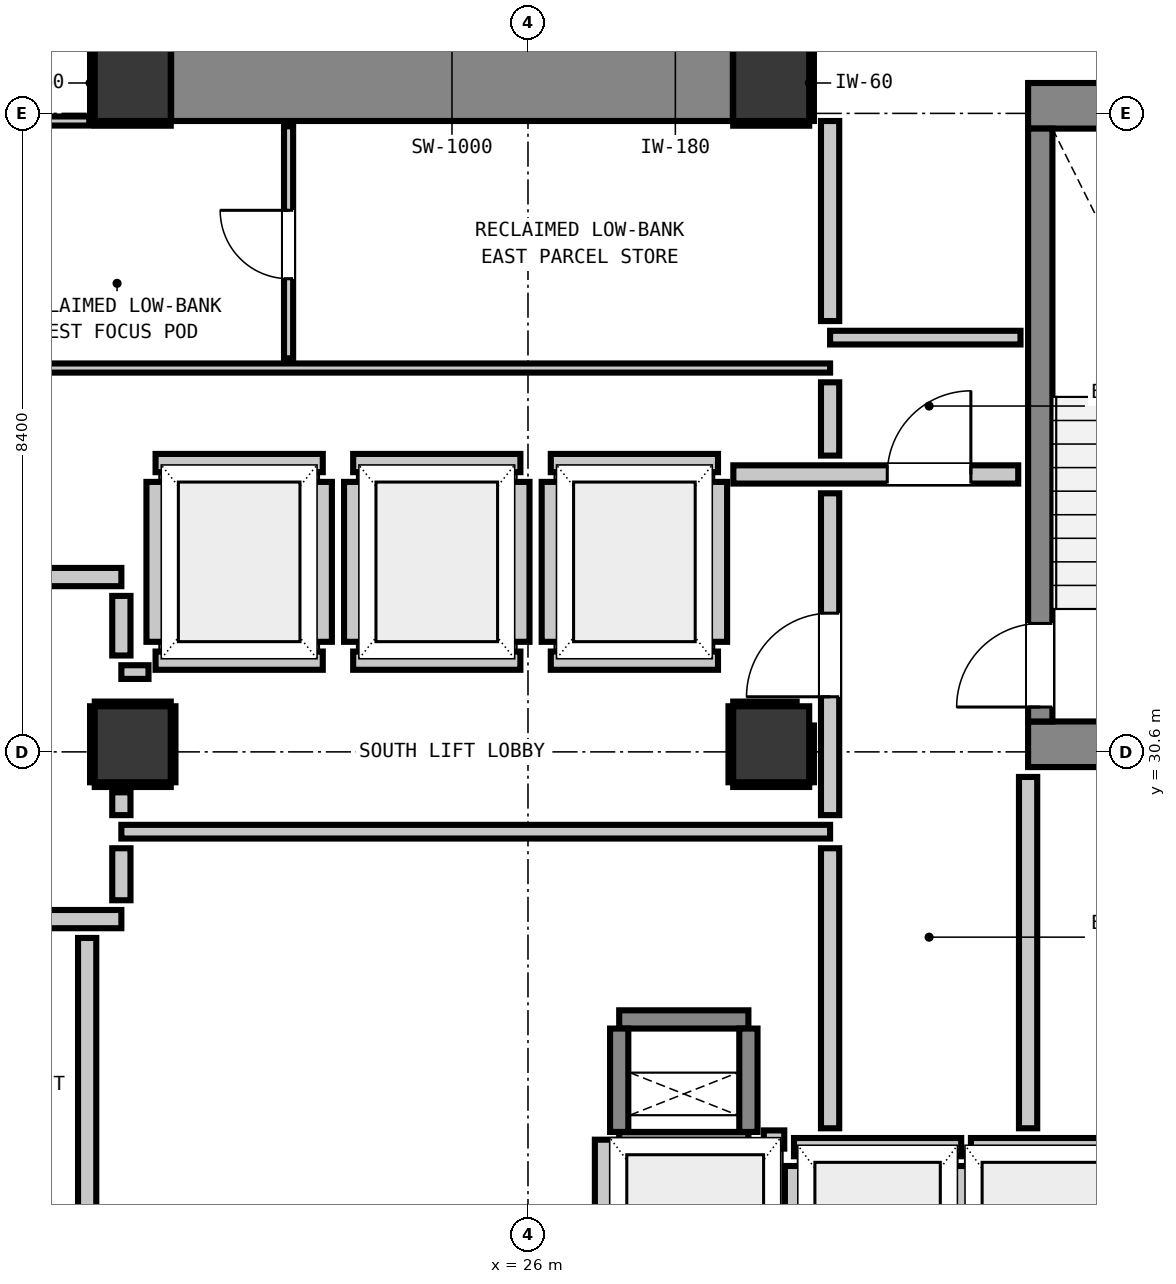
"""IFC4 building model, lengths in metres.
Left out: names, types, materials, properties, quantities, classifications, styles, units other than length and angle.
Written with IfcOpenShell. Run it as: python <this file> out.ifc"""

import sys

from ifc_helpers import new_model, si_unit, direction, frame, frame_2d, origin, origin_2d, place, context, subcontext, project, spatial, rectangle, extrude, element, fill, save


model = new_model("IFC4")
c1 = context("Model", 3, precision=1e-05, world=origin(), true_north=direction((0.0, 1.0)))
c2 = subcontext(c1, "Body", "Model", "MODEL_VIEW")
j1 = project(units=[si_unit("LENGTHUNIT", "METRE"), si_unit("PLANEANGLEUNIT", "RADIAN")], contexts=[c1])
p1 = place(None, origin())
s1 = spatial("IfcSite", under=j1, at=p1, CompositionType="ELEMENT")
p2 = place(p1, origin())
s2 = spatial("IfcBuilding", under=s1, at=p2, CompositionType="ELEMENT")
p3 = place(p2, frame((0.0, 0.0, 139.28)))
s3 = spatial("IfcBuildingStorey", under=s2, at=p3, CompositionType="ELEMENT", Elevation=139.28)
for number, where, z_axis, x_axis in (
    (1, (20.8, 39.4, 0.0), (0.0, 0.0, 1.0), (1.0, 0.0, 0.0)),
    (2, (29.2, 39.4, 0.0), (0.0, 0.0, 1.0), (1.0, 0.0, 0.0)),
):
    element("IfcColumn", number, at=place(p3, frame(where, z_axis=z_axis, x_axis=x_axis)), inside=s3, PredefinedType="COLUMN", context=c2, shape_type="SweptSolid", body=[
        extrude(rectangle(XDim=1.0, YDim=1.0, at=origin_2d()), origin(), (0.0, 0.0, 1.0), 3.32),
    ])
p4 = place(p3, frame((32.58, 39.1, 0.0), z_axis=(0.0, 0.0, 1.0), x_axis=(1.0, 0.0, 0.0)))
e3 = element("IfcWall", 3, at=p4, inside=s3, PredefinedType="SHEAR", context=c2, shape_type="SweptSolid", body=[
    extrude(rectangle(XDim=4.08, YDim=0.6, at=frame_2d((2.04, 0.0))), origin(), (0.0, 0.0, 1.0), 3.32),
])
p5 = place(p3, frame((32.58, 30.7, 0.0), z_axis=(0.0, 0.0, 1.0), x_axis=(1.0, 0.0, 0.0)))
e4 = element("IfcWall", 4, at=p5, inside=s3, PredefinedType="SHEAR", context=c2, shape_type="SweptSolid", body=[
    extrude(rectangle(XDim=3.415, YDim=0.6, at=frame_2d((1.708, 0.0))), origin(), (0.0, 0.0, 1.0), 3.32),
])
p6 = place(p3, frame((21.305, 39.4, 0.0), z_axis=(0.0, 0.0, 1.0), x_axis=(1.0, 0.0, 0.0)))
e5 = element("IfcWall", 5, at=p6, inside=s3, PredefinedType="SHEAR", context=c2, shape_type="SweptSolid", body=[
    extrude(rectangle(XDim=7.39, YDim=1.0, at=frame_2d((3.695, 0.0))), origin(), (0.0, 0.0, 1.0), 3.32),
])
p7 = place(p3, frame((32.74, 31.0, 0.0), z_axis=(0.0, 0.0, 1.0), x_axis=(0.0, 1.0, 0.0)))
e6 = element("IfcWall", 6, at=p7, inside=s3, PredefinedType="SHEAR", context=c2, shape_type="SweptSolid", body=[
    extrude(rectangle(XDim=7.8, YDim=0.32, at=frame_2d((3.9, 0.0))), origin(), (0.0, 0.0, 1.0), 3.32),
])
p8 = place(p7, frame((0.19, 0.0, 0.0)))
e7 = element("IfcOpeningElement", 7, at=p8, cuts=e6, PredefinedType="OPENING", context=c2, shape_type="SweptSolid", body=[
    extrude(rectangle(XDim=1.1, YDim=2.15, at=frame_2d((0.55, 1.075))), frame((0.0, 0.17, 0.0), z_axis=(0.0, -1.0, 0.0), x_axis=(1.0, 0.0, 0.0)), (0.0, 0.0, 1.0), 0.34),
])
for number, where, z_axis, x_axis in (
    (8, (27.2, 25.48, 0.0), (0.0, 0.0, 1.0), (1.0, 0.0, 0.0)),
    (9, (27.2, 27.08, 0.0), (0.0, 0.0, 1.0), (1.0, 0.0, 0.0)),
):
    element("IfcWall", number, at=place(p3, frame(where, z_axis=z_axis, x_axis=x_axis)), inside=s3, PredefinedType="SHEAR", context=c2, shape_type="SweptSolid", body=[
        extrude(rectangle(XDim=1.7, YDim=0.24, at=frame_2d((0.85, 0.0))), origin(), (0.0, 0.0, 1.0), 3.32),
    ])
for number, where, z_axis, x_axis in (
    (10, (27.2, 25.6, 0.0), (0.0, 0.0, 1.0), (0.0, 1.0, 0.0)),
    (11, (28.9, 25.6, 0.0), (0.0, 0.0, 1.0), (0.0, 1.0, 0.0)),
):
    element("IfcWall", number, at=place(p3, frame(where, z_axis=z_axis, x_axis=x_axis)), inside=s3, PredefinedType="SHEAR", context=c2, shape_type="SweptSolid", body=[
        extrude(rectangle(XDim=1.36, YDim=0.24, at=frame_2d((0.68, 0.0))), origin(), (0.0, 0.0, 1.0), 3.32),
    ])
for number, where, z_axis, x_axis in (
    (12, (20.8, 30.7, 0.0), (0.0, 0.0, 1.0), (1.0, 0.0, 0.0)),
    (13, (29.2, 30.7, 0.0), (0.0, 0.0, 1.0), (1.0, 0.0, 0.0)),
):
    element("IfcColumn", number, at=place(p3, frame(where, z_axis=z_axis, x_axis=x_axis)), inside=s3, PredefinedType="COLUMN", context=c2, shape_type="SweptSolid", body=[
        extrude(rectangle(XDim=1.0, YDim=1.0, at=origin_2d()), origin(), (0.0, 0.0, 1.0), 3.32),
    ])
for number, where, z_axis, x_axis in (
    (14, (21.1, 31.8, 0.0), (0.0, 0.0, 1.0), (1.0, 0.0, 0.0)),
    (15, (21.1, 34.4, 0.0), (0.0, 0.0, 1.0), (1.0, 0.0, 0.0)),
):
    element("IfcWall", number, at=place(p3, frame(where, z_axis=z_axis, x_axis=x_axis)), inside=s3, PredefinedType="PARTITIONING", context=c2, shape_type="SweptSolid", body=[
        extrude(rectangle(XDim=2.2, YDim=0.24, at=frame_2d((1.1, 0.0))), origin(), (0.0, 0.0, 1.0), 3.08),
    ])
p9 = place(p3, frame((21.1, 32.048, 0.0), z_axis=(0.0, 0.0, 1.0), x_axis=(0.0, 1.0, 0.0)))
e16 = element("IfcWall", 16, at=p9, inside=s3, PredefinedType="PARTITIONING", context=c2, shape_type="SweptSolid", body=[
    extrude(rectangle(XDim=2.104, YDim=0.24, at=frame_2d((1.052, 0.0))), origin(), (0.0, 0.0, 1.0), 2.315),
])
p10 = place(p3, frame((23.3, 32.048, 0.0), z_axis=(0.0, 0.0, 1.0), x_axis=(0.0, 1.0, 0.0)))
e17 = element("IfcWall", 17, at=p10, inside=s3, PredefinedType="PARTITIONING", context=c2, shape_type="SweptSolid", body=[
    extrude(rectangle(XDim=2.104, YDim=0.24, at=frame_2d((1.052, 0.0))), origin(), (0.0, 0.0, 1.0), 3.08),
])
for number, where, z_axis, x_axis in (
    (18, (23.7, 31.8, 0.0), (0.0, 0.0, 1.0), (1.0, 0.0, 0.0)),
    (19, (23.7, 34.4, 0.0), (0.0, 0.0, 1.0), (1.0, 0.0, 0.0)),
):
    element("IfcWall", number, at=place(p3, frame(where, z_axis=z_axis, x_axis=x_axis)), inside=s3, PredefinedType="PARTITIONING", context=c2, shape_type="SweptSolid", body=[
        extrude(rectangle(XDim=2.2, YDim=0.24, at=frame_2d((1.1, 0.0))), origin(), (0.0, 0.0, 1.0), 3.08),
    ])
for number, where, z_axis, x_axis in (
    (20, (23.7, 32.048, 0.0), (0.0, 0.0, 1.0), (0.0, 1.0, 0.0)),
    (21, (25.9, 32.048, 0.0), (0.0, 0.0, 1.0), (0.0, 1.0, 0.0)),
):
    element("IfcWall", number, at=place(p3, frame(where, z_axis=z_axis, x_axis=x_axis)), inside=s3, PredefinedType="PARTITIONING", context=c2, shape_type="SweptSolid", body=[
        extrude(rectangle(XDim=2.104, YDim=0.24, at=frame_2d((1.052, 0.0))), origin(), (0.0, 0.0, 1.0), 3.08),
    ])
for number, where, z_axis, x_axis in (
    (22, (26.3, 31.8, 0.0), (0.0, 0.0, 1.0), (1.0, 0.0, 0.0)),
    (23, (26.3, 34.4, 0.0), (0.0, 0.0, 1.0), (1.0, 0.0, 0.0)),
):
    element("IfcWall", number, at=place(p3, frame(where, z_axis=z_axis, x_axis=x_axis)), inside=s3, PredefinedType="PARTITIONING", context=c2, shape_type="SweptSolid", body=[
        extrude(rectangle(XDim=2.2, YDim=0.24, at=frame_2d((1.1, 0.0))), origin(), (0.0, 0.0, 1.0), 3.08),
    ])
for number, where, z_axis, x_axis in (
    (24, (26.3, 32.048, 0.0), (0.0, 0.0, 1.0), (0.0, 1.0, 0.0)),
    (25, (28.5, 32.048, 0.0), (0.0, 0.0, 1.0), (0.0, 1.0, 0.0)),
):
    element("IfcWall", number, at=place(p3, frame(where, z_axis=z_axis, x_axis=x_axis)), inside=s3, PredefinedType="PARTITIONING", context=c2, shape_type="SweptSolid", body=[
        extrude(rectangle(XDim=2.104, YDim=0.24, at=frame_2d((1.052, 0.0))), origin(), (0.0, 0.0, 1.0), 3.08),
    ])
p11 = place(p3, frame((29.5, 25.4, 0.0), z_axis=(0.0, 0.0, 1.0), x_axis=(1.0, 0.0, 0.0)))
e26 = element("IfcWall", 26, at=p11, inside=s3, PredefinedType="PARTITIONING", context=c2, shape_type="SweptSolid", body=[
    extrude(rectangle(XDim=2.2, YDim=0.24, at=frame_2d((1.1, 0.0))), origin(), (0.0, 0.0, 1.0), 3.08),
])
p12 = place(p3, frame((29.5, 22.632, 0.0), z_axis=(0.0, 0.0, 1.0), x_axis=(0.0, 1.0, 0.0)))
e27 = element("IfcWall", 27, at=p12, inside=s3, PredefinedType="PARTITIONING", context=c2, shape_type="SweptSolid", body=[
    extrude(rectangle(XDim=2.52, YDim=0.24, at=frame_2d((1.26, 0.0))), origin(), (0.0, 0.0, 1.0), 2.315),
])
p13 = place(p3, frame((31.7, 22.63, 0.0), z_axis=(0.0, 0.0, 1.0), x_axis=(0.0, 1.0, 0.0)))
e28 = element("IfcWall", 28, at=p13, inside=s3, PredefinedType="PARTITIONING", context=c2, shape_type="SweptSolid", body=[
    extrude(rectangle(XDim=2.522, YDim=0.24, at=frame_2d((1.261, 0.0))), origin(), (0.0, 0.0, 1.0), 3.08),
])
p14 = place(p3, frame((31.828, 25.4, 0.0), z_axis=(0.0, 0.0, 1.0), x_axis=(1.0, 0.0, 0.0)))
e29 = element("IfcWall", 29, at=p14, inside=s3, PredefinedType="PARTITIONING", context=c2, shape_type="SweptSolid", body=[
    extrude(rectangle(XDim=2.072, YDim=0.24, at=frame_2d((1.036, 0.0))), origin(), (0.0, 0.0, 1.0), 3.08),
])
p15 = place(p3, frame((29.103, 25.5, 0.0), z_axis=(0.0, 0.0, 1.0), x_axis=(1.0, 0.0, 0.0)))
e30 = element("IfcWall", 30, at=p15, inside=s3, PredefinedType="PARTITIONING", context=c2, shape_type="SweptSolid", body=[
    extrude(rectangle(XDim=0.269, YDim=0.24, at=frame_2d((0.135, 0.0))), origin(), (0.0, 0.0, 1.0), 3.08),
])
p16 = place(p3, frame((27.0, 22.63, 0.0), z_axis=(0.0, 0.0, 1.0), x_axis=(0.0, 1.0, 0.0)))
e31 = element("IfcWall", 31, at=p16, inside=s3, PredefinedType="PARTITIONING", context=c2, shape_type="SweptSolid", body=[
    extrude(rectangle(XDim=2.868, YDim=0.24, at=frame_2d((1.434, 0.0))), origin(), (0.0, 0.0, 1.0), 3.08),
])
p17 = place(p3, frame((17.45, 28.4, 0.0), z_axis=(0.0, 0.0, 1.0), x_axis=(1.0, 0.0, 0.0)))
e32 = element("IfcWall", 32, at=p17, inside=s3, PredefinedType="PARTITIONING", context=c2, shape_type="SweptSolid", body=[
    extrude(rectangle(XDim=3.2, YDim=0.24, at=frame_2d((1.6, 0.0))), origin(), (0.0, 0.0, 1.0), 3.08),
])
p18 = place(p17, frame((0.784, 0.0, 0.0)))
e33 = element("IfcOpeningElement", 33, at=p18, cuts=e32, PredefinedType="OPENING", context=c2, shape_type="SweptSolid", body=[
    extrude(rectangle(XDim=1.1, YDim=2.15, at=frame_2d((0.55, 1.075))), frame((0.0, 0.13, 0.0), z_axis=(0.0, -1.0, 0.0), x_axis=(1.0, 0.0, 0.0)), (0.0, 0.0, 1.0), 0.26),
])
p19 = place(p3, frame((17.45, 32.9, 0.0), z_axis=(0.0, 0.0, 1.0), x_axis=(1.0, 0.0, 0.0)))
e34 = element("IfcWall", 34, at=p19, inside=s3, PredefinedType="PARTITIONING", context=c2, shape_type="SweptSolid", body=[
    extrude(rectangle(XDim=3.2, YDim=0.24, at=frame_2d((1.6, 0.0))), origin(), (0.0, 0.0, 1.0), 3.08),
])
p20 = place(p19, frame((0.159, 0.0, 0.0)))
e35 = element("IfcOpeningElement", 35, at=p20, cuts=e34, PredefinedType="OPENING", context=c2, shape_type="SweptSolid", body=[
    extrude(rectangle(XDim=1.1, YDim=2.15, at=frame_2d((0.55, 1.075))), frame((0.0, 0.13, 0.0), z_axis=(0.0, -1.0, 0.0), x_axis=(1.0, 0.0, 0.0)), (0.0, 0.0, 1.0), 0.26),
])
p21 = place(p3, frame((28.702, 34.25, 0.0), z_axis=(0.0, 0.0, 1.0), x_axis=(1.0, 0.0, 0.0)))
e36 = element("IfcWall", 36, at=p21, inside=s3, PredefinedType="PARTITIONING", context=c2, shape_type="SweptSolid", body=[
    extrude(rectangle(XDim=3.748, YDim=0.24, at=frame_2d((1.874, 0.0))), origin(), (0.0, 0.0, 1.0), 3.08),
])
p22 = place(p21, frame((2.025, 0.0, 0.0)))
e37 = element("IfcOpeningElement", 37, at=p22, cuts=e36, PredefinedType="OPENING", context=c2, shape_type="SweptSolid", body=[
    extrude(rectangle(XDim=1.1, YDim=2.15, at=frame_2d((0.55, 1.075))), frame((0.0, 0.13, 0.0), z_axis=(0.0, -1.0, 0.0), x_axis=(1.0, 0.0, 0.0)), (0.0, 0.0, 1.0), 0.26),
])
p23 = place(p3, frame((20.65, 29.55, 0.0), z_axis=(0.0, 0.0, 1.0), x_axis=(1.0, 0.0, 0.0)))
e38 = element("IfcWall", 38, at=p23, inside=s3, PredefinedType="PARTITIONING", context=c2, shape_type="SweptSolid", body=[
    extrude(rectangle(XDim=9.325, YDim=0.18, at=frame_2d((4.663, 0.0))), origin(), (0.0, 0.0, 1.0), 3.08),
])
p24 = place(p3, frame((20.65, 31.65, 0.0), z_axis=(0.0, 0.0, 1.0), x_axis=(1.0, 0.0, 0.0)))
e39 = element("IfcWall", 39, at=p24, inside=s3, PredefinedType="PARTITIONING", context=c2, shape_type="SweptSolid", body=[
    extrude(rectangle(XDim=0.357, YDim=0.18, at=frame_2d((0.179, 0.0))), origin(), (0.0, 0.0, 1.0), 3.08),
])
p25 = place(p3, frame((29.975, 36.05, 0.0), z_axis=(0.0, 0.0, 1.0), x_axis=(1.0, 0.0, 0.0)))
e40 = element("IfcWall", 40, at=p25, inside=s3, PredefinedType="PARTITIONING", context=c2, shape_type="SweptSolid", body=[
    extrude(rectangle(XDim=2.505, YDim=0.18, at=frame_2d((1.252, 0.0))), origin(), (0.0, 0.0, 1.0), 3.08),
])
p26 = place(p3, frame((18.95, 35.65, 0.0), z_axis=(0.0, 0.0, 1.0), x_axis=(1.0, 0.0, 0.0)))
e41 = element("IfcWall", 41, at=p26, inside=s3, PredefinedType="PARTITIONING", context=c2, shape_type="SweptSolid", body=[
    extrude(rectangle(XDim=11.025, YDim=0.12, at=frame_2d((5.513, 0.0))), origin(), (0.0, 0.0, 1.0), 3.08),
])
p27 = place(p3, frame((18.95, 38.9, 0.0), z_axis=(0.0, 0.0, 1.0), x_axis=(1.0, 0.0, 0.0)))
e42 = element("IfcWall", 42, at=p27, inside=s3, PredefinedType="PARTITIONING", context=c2, shape_type="SweptSolid", body=[
    extrude(rectangle(XDim=1.278, YDim=0.12, at=frame_2d((0.639, 0.0))), origin(), (0.0, 0.0, 1.0), 3.08),
])
p28 = place(p3, frame((20.2, 22.586, 0.0), z_axis=(0.0, 0.0, 1.0), x_axis=(0.0, 1.0, 0.0)))
e43 = element("IfcWall", 43, at=p28, inside=s3, PredefinedType="PARTITIONING", context=c2, shape_type="SweptSolid", body=[
    extrude(rectangle(XDim=5.566, YDim=0.24, at=frame_2d((2.783, 0.0))), origin(), (0.0, 0.0, 1.0), 3.08),
])
p29 = place(p3, frame((20.65, 28.648, 0.0), z_axis=(0.0, 0.0, 1.0), x_axis=(0.0, 1.0, 0.0)))
e44 = element("IfcWall", 44, at=p29, inside=s3, PredefinedType="PARTITIONING", context=c2, shape_type="SweptSolid", body=[
    extrude(rectangle(XDim=0.684, YDim=0.24, at=frame_2d((0.342, 0.0))), origin(), (0.0, 0.0, 1.0), 2.315),
])
p30 = place(p3, frame((20.65, 29.768, 0.0), z_axis=(0.0, 0.0, 1.0), x_axis=(0.0, 1.0, 0.0)))
e45 = element("IfcWall", 45, at=p30, inside=s3, PredefinedType="PARTITIONING", context=c2, shape_type="SweptSolid", body=[
    extrude(rectangle(XDim=0.3, YDim=0.24, at=frame_2d((0.15, 0.0))), origin(), (0.0, 0.0, 1.0), 2.315),
])
p31 = place(p3, frame((20.65, 31.868, 0.0), z_axis=(0.0, 0.0, 1.0), x_axis=(0.0, 1.0, 0.0)))
e46 = element("IfcWall", 46, at=p31, inside=s3, PredefinedType="PARTITIONING", context=c2, shape_type="SweptSolid", body=[
    extrude(rectangle(XDim=0.784, YDim=0.24, at=frame_2d((0.392, 0.0))), origin(), (0.0, 0.0, 1.0), 2.315),
])
p32 = place(p3, frame((29.975, 25.648, 0.0), z_axis=(0.0, 0.0, 1.0), x_axis=(0.0, 1.0, 0.0)))
e47 = element("IfcWall", 47, at=p32, inside=s3, PredefinedType="PARTITIONING", context=c2, shape_type="SweptSolid", body=[
    extrude(rectangle(XDim=3.684, YDim=0.24, at=frame_2d((1.842, 0.0))), origin(), (0.0, 0.0, 1.0), 3.08),
])
p33 = place(p3, frame((29.975, 29.768, 0.0), z_axis=(0.0, 0.0, 1.0), x_axis=(0.0, 1.0, 0.0)))
e48 = element("IfcWall", 48, at=p33, inside=s3, PredefinedType="PARTITIONING", context=c2, shape_type="SweptSolid", body=[
    extrude(rectangle(XDim=4.234, YDim=0.24, at=frame_2d((2.117, 0.0))), origin(), (0.0, 0.0, 1.0), 3.08),
])
p34 = place(p33, frame((1.557, 0.0, 0.0)))
e49 = element("IfcOpeningElement", 49, at=p34, cuts=e48, PredefinedType="OPENING", context=c2, shape_type="SweptSolid", body=[
    extrude(rectangle(XDim=1.1, YDim=2.15, at=frame_2d((0.55, 1.075))), frame((0.0, 0.13, 0.0), z_axis=(0.0, -1.0, 0.0), x_axis=(1.0, 0.0, 0.0)), (0.0, 0.0, 1.0), 0.26),
])
p35 = place(p3, frame((29.975, 34.498, 0.0), z_axis=(0.0, 0.0, 1.0), x_axis=(0.0, 1.0, 0.0)))
e50 = element("IfcWall", 50, at=p35, inside=s3, PredefinedType="PARTITIONING", context=c2, shape_type="SweptSolid", body=[
    extrude(rectangle(XDim=0.964, YDim=0.24, at=frame_2d((0.482, 0.0))), origin(), (0.0, 0.0, 1.0), 3.08),
])
p36 = place(p3, frame((29.975, 36.268, 0.0), z_axis=(0.0, 0.0, 1.0), x_axis=(0.0, 1.0, 0.0)))
e51 = element("IfcWall", 51, at=p36, inside=s3, PredefinedType="PARTITIONING", context=c2, shape_type="SweptSolid", body=[
    extrude(rectangle(XDim=2.632, YDim=0.24, at=frame_2d((1.316, 0.0))), origin(), (0.0, 0.0, 1.0), 3.08),
])
p37 = place(p3, frame((32.58, 25.648, 0.0), z_axis=(0.0, 0.0, 1.0), x_axis=(0.0, 1.0, 0.0)))
e52 = element("IfcWall", 52, at=p37, inside=s3, PredefinedType="PARTITIONING", context=c2, shape_type="SweptSolid", body=[
    extrude(rectangle(XDim=4.622, YDim=0.24, at=frame_2d((2.311, 0.0))), origin(), (0.0, 0.0, 1.0), 3.08),
])
p38 = place(p3, frame((22.85, 35.778, 0.0), z_axis=(0.0, 0.0, 1.0), x_axis=(0.0, 1.0, 0.0)))
e53 = element("IfcWall", 53, at=p38, inside=s3, PredefinedType="PARTITIONING", context=c2, shape_type="SweptSolid", body=[
    extrude(rectangle(XDim=3.052, YDim=0.12, at=frame_2d((1.526, 0.0))), origin(), (0.0, 0.0, 1.0), 3.08),
])
p39 = place(p38, frame((1.047, 0.0, 0.0)))
e54 = element("IfcOpeningElement", 54, at=p39, cuts=e53, PredefinedType="OPENING", context=c2, shape_type="SweptSolid", body=[
    extrude(rectangle(XDim=0.9, YDim=2.1, at=frame_2d((0.45, 1.05))), frame((0.0, 0.07, 0.0), z_axis=(0.0, -1.0, 0.0), x_axis=(1.0, 0.0, 0.0)), (0.0, 0.0, 1.0), 0.14),
])
for number, where, z_axis, x_axis in (
    (55, (20.3, 38.868, 0.0), (0.0, 0.0, 1.0), (1.0, 0.0, 0.0)),
    (56, (20.268, 38.9, 0.0), (0.0, 0.0, 1.0), (0.0, 1.0, 0.0)),
    (57, (28.7, 38.868, 0.0), (0.0, 0.0, 1.0), (1.0, 0.0, 0.0)),
    (58, (29.732, 38.9, 0.0), (0.0, 0.0, 1.0), (0.0, 1.0, 0.0)),
    (59, (20.3, 30.168, 0.0), (0.0, 0.0, 1.0), (1.0, 0.0, 0.0)),
    (60, (20.3, 31.232, 0.0), (0.0, 0.0, 1.0), (1.0, 0.0, 0.0)),
    (61, (20.268, 30.2, 0.0), (0.0, 0.0, 1.0), (0.0, 1.0, 0.0)),
    (62, (21.332, 30.2, 0.0), (0.0, 0.0, 1.0), (0.0, 1.0, 0.0)),
    (63, (28.7, 30.168, 0.0), (0.0, 0.0, 1.0), (1.0, 0.0, 0.0)),
):
    element("IfcWall", number, at=place(p3, frame(where, z_axis=z_axis, x_axis=x_axis)), inside=s3, PredefinedType="PARTITIONING", context=c2, shape_type="SweptSolid", body=[
        extrude(rectangle(XDim=1.0, YDim=0.06, at=frame_2d((0.5, 0.0))), origin(), (0.0, 0.0, 1.0), 1.45),
    ])
p40 = place(p3, frame((28.7, 31.232, 0.0), z_axis=(0.0, 0.0, 1.0), x_axis=(1.0, 0.0, 0.0)))
e64 = element("IfcWall", 64, at=p40, inside=s3, PredefinedType="PARTITIONING", context=c2, shape_type="SweptSolid", body=[
    extrude(rectangle(XDim=0.835, YDim=0.06, at=frame_2d((0.417, 0.0))), origin(), (0.0, 0.0, 1.0), 1.45),
])
p41 = place(p3, frame((28.668, 30.2, 0.0), z_axis=(0.0, 0.0, 1.0), x_axis=(0.0, 1.0, 0.0)))
e65 = element("IfcWall", 65, at=p41, inside=s3, PredefinedType="PARTITIONING", context=c2, shape_type="SweptSolid", body=[
    extrude(rectangle(XDim=1.0, YDim=0.06, at=frame_2d((0.5, 0.0))), origin(), (0.0, 0.0, 1.0), 1.45),
])
p42 = place(p3, frame((29.732, 30.2, 0.0), z_axis=(0.0, 0.0, 1.0), x_axis=(0.0, 1.0, 0.0)))
e66 = element("IfcWall", 66, at=p42, inside=s3, PredefinedType="PARTITIONING", context=c2, shape_type="SweptSolid", body=[
    extrude(rectangle(XDim=0.747, YDim=0.06, at=frame_2d((0.374, 0.0))), origin(), (0.0, 0.0, 1.0), 1.45),
])
p43 = place(p8, origin())
e67 = element("IfcDoor", 67, at=p43, inside=s3, OperationType="SINGLE_SWING_LEFT", PredefinedType="DOOR", context=c2, shape_type="SweptSolid", body=[
    extrude(rectangle(XDim=1.1, YDim=2.15, at=frame_2d((0.55, 1.075))), frame((0.0, 0.025, 0.0), z_axis=(0.0, -1.0, 0.0), x_axis=(1.0, 0.0, 0.0)), (0.0, 0.0, 1.0), 0.05),
])
fill(e7, e67)
p44 = place(p34, origin())
e68 = element("IfcDoor", 68, at=p44, inside=s3, OperationType="SINGLE_SWING_LEFT", PredefinedType="DOOR", context=c2, shape_type="SweptSolid", body=[
    extrude(rectangle(XDim=1.1, YDim=2.15, at=frame_2d((0.55, 1.075))), frame((0.0, 0.025, 0.0), z_axis=(0.0, -1.0, 0.0), x_axis=(1.0, 0.0, 0.0)), (0.0, 0.0, 1.0), 0.05),
])
fill(e49, e68)
p45 = place(p22, origin())
e69 = element("IfcDoor", 69, at=p45, inside=s3, OperationType="SINGLE_SWING_RIGHT", PredefinedType="DOOR", context=c2, shape_type="SweptSolid", body=[
    extrude(rectangle(XDim=1.1, YDim=2.15, at=frame_2d((0.55, 1.075))), frame((0.0, 0.025, 0.0), z_axis=(0.0, -1.0, 0.0), x_axis=(1.0, 0.0, 0.0)), (0.0, 0.0, 1.0), 0.05),
])
fill(e37, e69)
p46 = place(p39, origin())
e70 = element("IfcDoor", 70, at=p46, inside=s3, OperationType="SINGLE_SWING_RIGHT", PredefinedType="DOOR", context=c2, shape_type="SweptSolid", body=[
    extrude(rectangle(XDim=0.9, YDim=2.1, at=frame_2d((0.45, 1.05))), frame((0.0, 0.025, 0.0), z_axis=(0.0, -1.0, 0.0), x_axis=(1.0, 0.0, 0.0)), (0.0, 0.0, 1.0), 0.05),
])
fill(e54, e70)
save(model, sys.argv[1])
